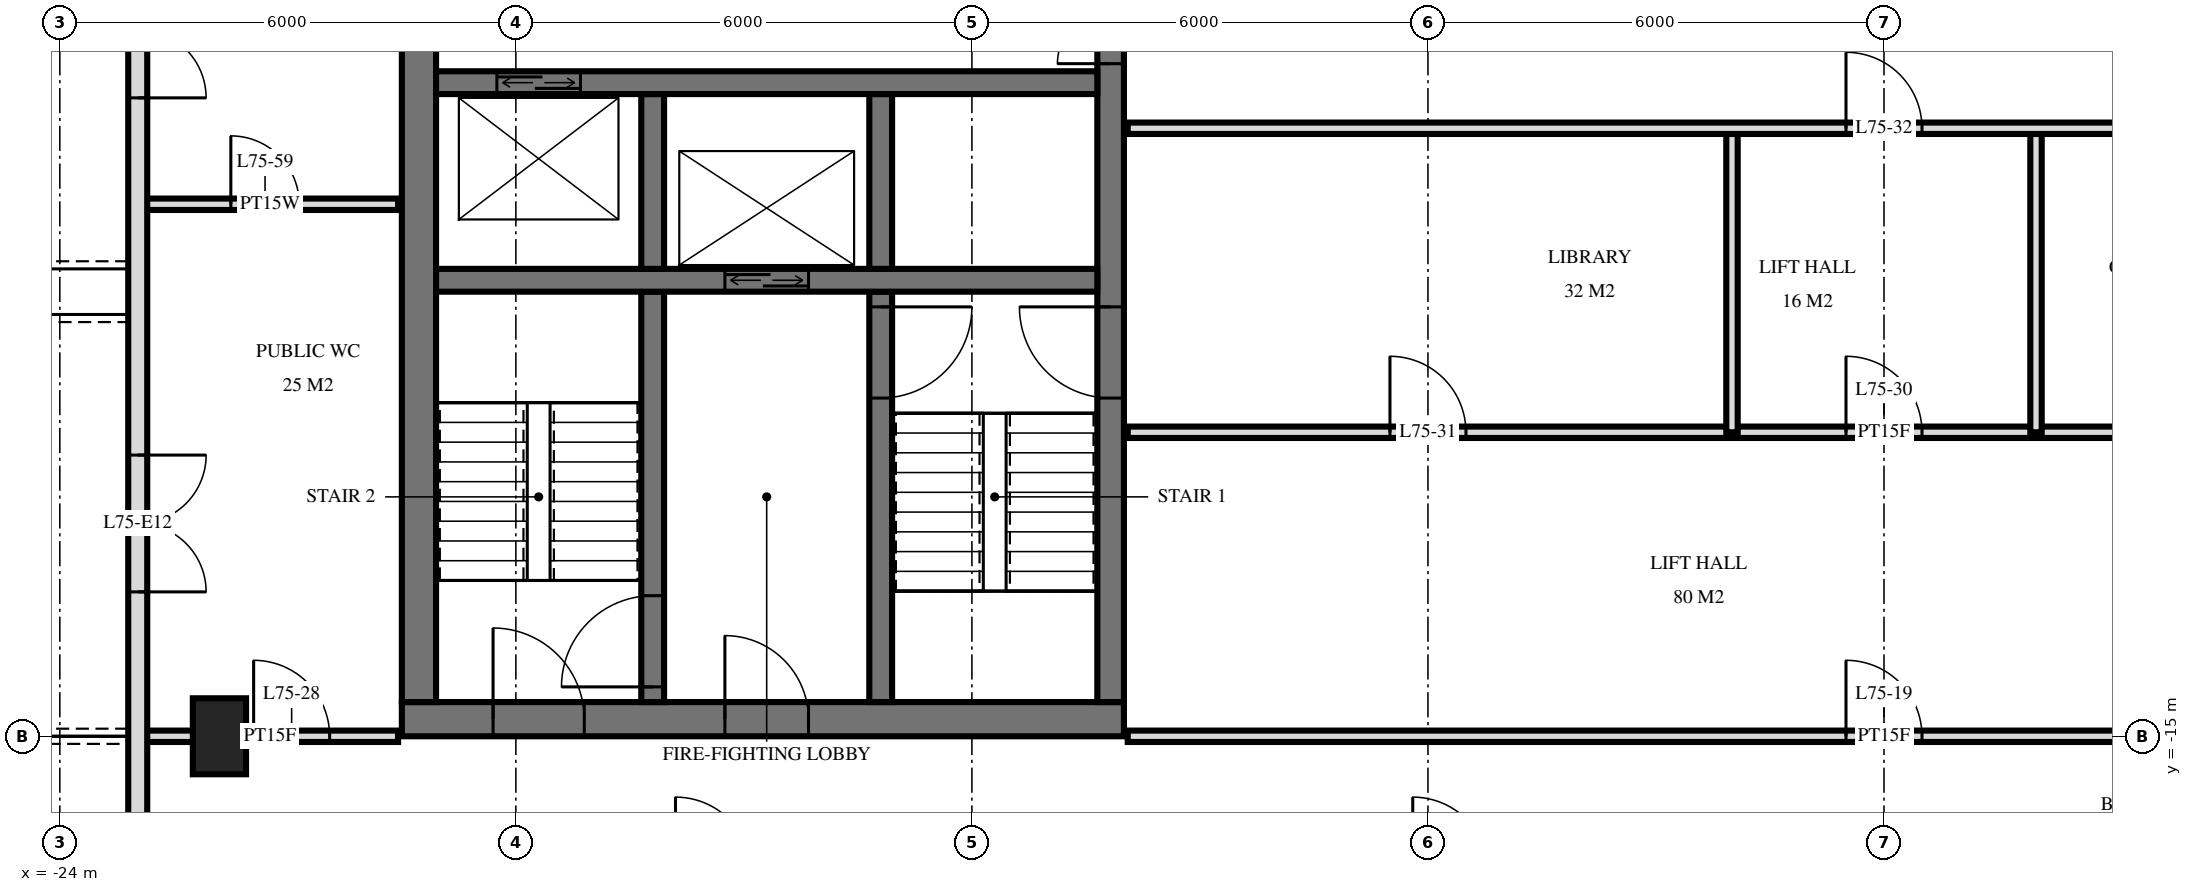
"""IFC4 building model, lengths in metres.
Left out: names, types, materials, properties, quantities, classifications, styles, units other than length and angle.
Written with IfcOpenShell. Run it as: python <this file> out.ifc"""

import sys

from ifc_helpers import new_model, si_unit, direction, frame, frame_2d, origin, origin_2d, place, context, subcontext, project, spatial, rectangle, extrude, element, fill, save


model = new_model("IFC4")
c1 = context("Model", 3, precision=1e-05, world=origin(), true_north=direction((0.0, 1.0)))
c2 = subcontext(c1, "Body", "Model", "MODEL_VIEW")
j1 = project(units=[si_unit("LENGTHUNIT", "METRE"), si_unit("PLANEANGLEUNIT", "RADIAN")], contexts=[c1])
p1 = place(None, origin())
s1 = spatial("IfcSite", under=j1, at=p1, CompositionType="ELEMENT")
p2 = place(p1, origin())
s2 = spatial("IfcBuilding", under=s1, at=p2, CompositionType="ELEMENT")
p3 = place(p2, frame((0.0, 0.0, 284.1)))
s3 = spatial("IfcBuildingStorey", under=s2, at=p3, CompositionType="ELEMENT", Elevation=284.1)
p4 = place(p3, frame((-21.9, -15.0, 0.0), z_axis=(0.0, 0.0, 1.0), x_axis=(0.0, 1.0, 0.0)))
e1 = element("IfcColumn", 1, at=p4, inside=s3, PredefinedType="COLUMN", context=c2, shape_type="SweptSolid", body=[
    extrude(rectangle(XDim=1.0, YDim=0.7, at=origin_2d()), origin(), (0.0, 0.0, 1.0), 3.5),
])
p5 = place(p3, frame((-19.5, -14.775, 0.0), z_axis=(0.0, 0.0, 1.0), x_axis=(1.0, 0.0, 0.0)))
e2 = element("IfcWall", 2, at=p5, inside=s3, PredefinedType="SHEAR", context=c2, shape_type="SweptSolid", body=[
    extrude(rectangle(XDim=9.5, YDim=0.45, at=frame_2d((4.75, 0.0))), origin(), (0.0, 0.0, 1.0), 3.5),
])
p6 = place(p5, frame((1.2, 0.0, 0.0)))
e3 = element("IfcOpeningElement", 3, at=p6, cuts=e2, PredefinedType="OPENING", context=c2, shape_type="SweptSolid", body=[
    extrude(rectangle(XDim=1.2, YDim=2.1, at=frame_2d((0.6, 1.05))), frame((0.0, 0.235, 0.0), z_axis=(0.0, -1.0, 0.0), x_axis=(1.0, 0.0, 0.0)), (0.0, 0.0, 1.0), 0.47),
])
p7 = place(p5, frame((4.25, 0.0, 0.0)))
e4 = element("IfcOpeningElement", 4, at=p7, cuts=e2, PredefinedType="OPENING", context=c2, shape_type="SweptSolid", body=[
    extrude(rectangle(XDim=1.1, YDim=2.1, at=frame_2d((0.55, 1.05))), frame((0.0, 0.235, 0.0), z_axis=(0.0, -1.0, 0.0), x_axis=(1.0, 0.0, 0.0)), (0.0, 0.0, 1.0), 0.47),
])
p8 = place(p3, frame((-10.175, -14.55, 0.0), z_axis=(0.0, 0.0, 1.0), x_axis=(0.0, 1.0, 0.0)))
e5 = element("IfcWall", 5, at=p8, inside=s3, PredefinedType="SHEAR", context=c2, shape_type="SweptSolid", body=[
    extrude(rectangle(XDim=14.1, YDim=0.35, at=frame_2d((7.05, 0.0))), origin(), (0.0, 0.0, 1.0), 3.5),
])
p9 = place(p8, frame((8.4, 0.0, 0.0)))
e6 = element("IfcOpeningElement", 6, at=p9, cuts=e5, PredefinedType="OPENING", context=c2, shape_type="SweptSolid", body=[
    extrude(rectangle(XDim=1.4, YDim=2.4, at=frame_2d((0.7, 1.2))), frame((0.0, 0.185, 0.0), z_axis=(0.0, -1.0, 0.0), x_axis=(1.0, 0.0, 0.0)), (0.0, 0.0, 1.0), 0.37),
])
p10 = place(p8, frame((10.0, 0.0, 0.0)))
e7 = element("IfcOpeningElement", 7, at=p10, cuts=e5, PredefinedType="OPENING", context=c2, shape_type="SweptSolid", body=[
    extrude(rectangle(XDim=1.4, YDim=2.4, at=frame_2d((0.7, 1.2))), frame((0.0, 0.185, 0.0), z_axis=(0.0, -1.0, 0.0), x_axis=(1.0, 0.0, 0.0)), (0.0, 0.0, 1.0), 0.37),
])
p11 = place(p8, frame((4.0, 0.0, 0.0)))
e8 = element("IfcOpeningElement", 8, at=p11, cuts=e5, PredefinedType="OPENING", context=c2, shape_type="SweptSolid", body=[
    extrude(rectangle(XDim=1.2, YDim=2.1, at=frame_2d((0.6, 1.05))), frame((0.0, 0.185, 0.0), z_axis=(0.0, -1.0, 0.0), x_axis=(1.0, 0.0, 0.0)), (0.0, 0.0, 1.0), 0.37),
])
p12 = place(p3, frame((-19.275, -14.55, 0.0), z_axis=(0.0, 0.0, 1.0), x_axis=(0.0, 1.0, 0.0)))
e9 = element("IfcWall", 9, at=p12, inside=s3, PredefinedType="SHEAR", context=c2, shape_type="SweptSolid", body=[
    extrude(rectangle(XDim=14.1, YDim=0.45, at=frame_2d((7.05, 0.0))), origin(), (0.0, 0.0, 1.0), 3.5),
])
p13 = place(p3, frame((-19.05, -6.4, 0.0), z_axis=(0.0, 0.0, 1.0), x_axis=(1.0, 0.0, 0.0)))
e10 = element("IfcWall", 10, at=p13, inside=s3, PredefinedType="SHEAR", context=c2, shape_type="SweptSolid", body=[
    extrude(rectangle(XDim=8.7, YDim=0.3, at=frame_2d((4.35, 0.0))), origin(), (0.0, 0.0, 1.0), 3.5),
])
p14 = place(p13, frame((0.8, 0.0, 0.0)))
e11 = element("IfcOpeningElement", 11, at=p14, cuts=e10, PredefinedType="OPENING", context=c2, shape_type="SweptSolid", body=[
    extrude(rectangle(XDim=1.1, YDim=2.1, at=frame_2d((0.55, 1.05))), frame((0.0, 0.16, 0.0), z_axis=(0.0, -1.0, 0.0), x_axis=(1.0, 0.0, 0.0)), (0.0, 0.0, 1.0), 0.32),
])
p15 = place(p3, frame((-19.05, -9.0, 0.0), z_axis=(0.0, 0.0, 1.0), x_axis=(1.0, 0.0, 0.0)))
e12 = element("IfcWall", 12, at=p15, inside=s3, PredefinedType="SHEAR", context=c2, shape_type="SweptSolid", body=[
    extrude(rectangle(XDim=8.7, YDim=0.3, at=frame_2d((4.35, 0.0))), origin(), (0.0, 0.0, 1.0), 3.5),
])
p16 = place(p15, frame((3.8, 0.0, 0.0)))
e13 = element("IfcOpeningElement", 13, at=p16, cuts=e12, PredefinedType="OPENING", context=c2, shape_type="SweptSolid", body=[
    extrude(rectangle(XDim=1.1, YDim=2.1, at=frame_2d((0.55, 1.05))), frame((0.0, 0.16, 0.0), z_axis=(0.0, -1.0, 0.0), x_axis=(1.0, 0.0, 0.0)), (0.0, 0.0, 1.0), 0.32),
])
p17 = place(p3, frame((-13.2, -8.85, 0.0), z_axis=(0.0, 0.0, 1.0), x_axis=(0.0, 1.0, 0.0)))
e14 = element("IfcWall", 14, at=p17, inside=s3, PredefinedType="SHEAR", context=c2, shape_type="SweptSolid", body=[
    extrude(rectangle(XDim=2.3, YDim=0.3, at=frame_2d((1.15, 0.0))), origin(), (0.0, 0.0, 1.0), 3.5),
])
p18 = place(p3, frame((-13.2, -14.55, 0.0), z_axis=(0.0, 0.0, 1.0), x_axis=(0.0, 1.0, 0.0)))
e15 = element("IfcWall", 15, at=p18, inside=s3, PredefinedType="SHEAR", context=c2, shape_type="SweptSolid", body=[
    extrude(rectangle(XDim=5.4, YDim=0.3, at=frame_2d((2.7, 0.0))), origin(), (0.0, 0.0, 1.0), 3.5),
])
p19 = place(p18, frame((4.0, 0.0, 0.0)))
e16 = element("IfcOpeningElement", 16, at=p19, cuts=e15, PredefinedType="OPENING", context=c2, shape_type="SweptSolid", body=[
    extrude(rectangle(XDim=1.2, YDim=2.1, at=frame_2d((0.6, 1.05))), frame((0.0, 0.16, 0.0), z_axis=(0.0, -1.0, 0.0), x_axis=(1.0, 0.0, 0.0)), (0.0, 0.0, 1.0), 0.32),
])
p20 = place(p3, frame((-16.2, -8.85, 0.0), z_axis=(0.0, 0.0, 1.0), x_axis=(0.0, 1.0, 0.0)))
e17 = element("IfcWall", 17, at=p20, inside=s3, PredefinedType="SHEAR", context=c2, shape_type="SweptSolid", body=[
    extrude(rectangle(XDim=2.3, YDim=0.3, at=frame_2d((1.15, 0.0))), origin(), (0.0, 0.0, 1.0), 3.5),
])
p21 = place(p3, frame((-16.2, -14.55, 0.0), z_axis=(0.0, 0.0, 1.0), x_axis=(0.0, 1.0, 0.0)))
e18 = element("IfcWall", 18, at=p21, inside=s3, PredefinedType="SHEAR", context=c2, shape_type="SweptSolid", body=[
    extrude(rectangle(XDim=5.4, YDim=0.3, at=frame_2d((2.7, 0.0))), origin(), (0.0, 0.0, 1.0), 3.5),
])
p22 = place(p21, frame((0.2, 0.0, 0.0)))
e19 = element("IfcOpeningElement", 19, at=p22, cuts=e18, PredefinedType="OPENING", context=c2, shape_type="SweptSolid", body=[
    extrude(rectangle(XDim=1.2, YDim=2.1, at=frame_2d((0.6, 1.05))), frame((0.0, 0.16, 0.0), z_axis=(0.0, -1.0, 0.0), x_axis=(1.0, 0.0, 0.0)), (0.0, 0.0, 1.0), 0.32),
])
p23 = place(p3, frame((-22.975, -3.325, 0.0), z_axis=(0.0, 0.0, 1.0), x_axis=(0.0, -1.0, 0.0)))
e20 = element("IfcWall", 20, at=p23, inside=s3, PredefinedType="SOLIDWALL", context=c2, shape_type="SweptSolid", body=[
    extrude(rectangle(XDim=25.951, YDim=0.25, at=frame_2d((12.975, 0.0))), origin(), (0.0, 0.0, 1.0), 3.22),
])
p24 = place(p23, frame((1.475, 0.0, 0.0)))
e21 = element("IfcOpeningElement", 21, at=p24, cuts=e20, PredefinedType="OPENING", context=c2, shape_type="SweptSolid", body=[
    extrude(rectangle(XDim=1.8, YDim=2.4, at=frame_2d((0.9, 1.2))), frame((0.0, 0.135, 0.0), z_axis=(0.0, -1.0, 0.0), x_axis=(1.0, 0.0, 0.0)), (0.0, 0.0, 1.0), 0.27),
])
p25 = place(p23, frame((7.975, 0.0, 0.0)))
e22 = element("IfcOpeningElement", 22, at=p25, cuts=e20, PredefinedType="OPENING", context=c2, shape_type="SweptSolid", body=[
    extrude(rectangle(XDim=1.8, YDim=2.4, at=frame_2d((0.9, 1.2))), frame((0.0, 0.135, 0.0), z_axis=(0.0, -1.0, 0.0), x_axis=(1.0, 0.0, 0.0)), (0.0, 0.0, 1.0), 0.27),
])
p26 = place(p23, frame((18.175, 0.0, 0.0)))
e23 = element("IfcOpeningElement", 23, at=p26, cuts=e20, PredefinedType="OPENING", context=c2, shape_type="SweptSolid", body=[
    extrude(rectangle(XDim=1.8, YDim=2.4, at=frame_2d((0.9, 1.2))), frame((0.0, 0.135, 0.0), z_axis=(0.0, -1.0, 0.0), x_axis=(1.0, 0.0, 0.0)), (0.0, 0.0, 1.0), 0.27),
])
p27 = place(p23, frame((21.075, 0.0, 0.0)))
e24 = element("IfcOpeningElement", 24, at=p27, cuts=e20, PredefinedType="OPENING", context=c2, shape_type="SweptSolid", body=[
    extrude(rectangle(XDim=1.8, YDim=2.4, at=frame_2d((0.9, 1.2))), frame((0.0, 0.135, 0.0), z_axis=(0.0, -1.0, 0.0), x_axis=(1.0, 0.0, 0.0)), (0.0, 0.0, 1.0), 0.27),
])
p28 = place(p23, frame((23.825, 0.0, 0.9)))
e25 = element("IfcOpeningElement", 25, at=p28, cuts=e20, PredefinedType="OPENING", context=c2, shape_type="SweptSolid", body=[
    extrude(rectangle(XDim=1.8, YDim=1.5, at=frame_2d((0.9, 0.75))), frame((0.0, 0.135, 0.0), z_axis=(0.0, -1.0, 0.0), x_axis=(1.0, 0.0, 0.0)), (0.0, 0.0, 1.0), 0.27),
])
for number, where, z_axis, x_axis in (
    (26, (2.0, -11.0, 0.0), (0.0, 0.0, 1.0), (0.0, 1.0, 0.0)),
    (27, (-2.0, -11.0, 0.0), (0.0, 0.0, 1.0), (0.0, 1.0, 0.0)),
):
    element("IfcWall", number, at=place(p3, frame(where, z_axis=z_axis, x_axis=x_axis)), inside=s3, PredefinedType="PARTITIONING", context=c2, shape_type="SweptSolid", body=[
        extrude(rectangle(XDim=4.0, YDim=0.15, at=frame_2d((2.0, 0.0))), origin(), (0.0, 0.0, 1.0), 3.22),
    ])
p29 = place(p3, frame((-22.92, -15.0, 0.0), z_axis=(0.0, 0.0, 1.0), x_axis=(1.0, 0.0, 0.0)))
e28 = element("IfcWall", 28, at=p29, inside=s3, PredefinedType="PARTITIONING", context=c2, shape_type="SweptSolid", body=[
    extrude(rectangle(XDim=3.37, YDim=0.15, at=frame_2d((1.685, 0.0))), origin(), (0.0, 0.0, 1.0), 3.22),
])
p30 = place(p29, frame((1.47, 0.0, 0.0)))
e29 = element("IfcOpeningElement", 29, at=p30, cuts=e28, PredefinedType="OPENING", context=c2, shape_type="SweptSolid", body=[
    extrude(rectangle(XDim=1.0, YDim=2.1, at=frame_2d((0.5, 1.05))), frame((0.0, 0.085, 0.0), z_axis=(0.0, -1.0, 0.0), x_axis=(1.0, 0.0, 0.0)), (0.0, 0.0, 1.0), 0.17),
])
p31 = place(p3, frame((-9.95, -15.0, 0.0), z_axis=(0.0, 0.0, 1.0), x_axis=(1.0, 0.0, 0.0)))
e30 = element("IfcWall", 30, at=p31, inside=s3, PredefinedType="PARTITIONING", context=c2, shape_type="SweptSolid", body=[
    extrude(rectangle(XDim=19.9, YDim=0.15, at=frame_2d((9.95, 0.0))), origin(), (0.0, 0.0, 1.0), 2.584),
])
p32 = place(p31, frame((9.45, 0.0, 0.0)))
e31 = element("IfcOpeningElement", 31, at=p32, cuts=e30, PredefinedType="OPENING", context=c2, shape_type="SweptSolid", body=[
    extrude(rectangle(XDim=1.0, YDim=2.1, at=frame_2d((0.5, 1.05))), frame((0.0, 0.085, 0.0), z_axis=(0.0, -1.0, 0.0), x_axis=(1.0, 0.0, 0.0)), (0.0, 0.0, 1.0), 0.17),
])
p33 = place(p3, frame((-9.95, -11.0, 0.0), z_axis=(0.0, 0.0, 1.0), x_axis=(1.0, 0.0, 0.0)))
e32 = element("IfcWall", 32, at=p33, inside=s3, PredefinedType="PARTITIONING", context=c2, shape_type="SweptSolid", body=[
    extrude(rectangle(XDim=19.9, YDim=0.15, at=frame_2d((9.95, 0.0))), origin(), (0.0, 0.0, 1.0), 3.22),
])
p34 = place(p33, frame((9.45, 0.0, 0.0)))
e33 = element("IfcOpeningElement", 33, at=p34, cuts=e32, PredefinedType="OPENING", context=c2, shape_type="SweptSolid", body=[
    extrude(rectangle(XDim=1.0, YDim=2.1, at=frame_2d((0.5, 1.05))), frame((0.0, 0.085, 0.0), z_axis=(0.0, -1.0, 0.0), x_axis=(1.0, 0.0, 0.0)), (0.0, 0.0, 1.0), 0.17),
])
p35 = place(p33, frame((3.45, 0.0, 0.0)))
e34 = element("IfcOpeningElement", 34, at=p35, cuts=e32, PredefinedType="OPENING", context=c2, shape_type="SweptSolid", body=[
    extrude(rectangle(XDim=1.0, YDim=2.1, at=frame_2d((0.5, 1.05))), frame((0.0, 0.085, 0.0), z_axis=(0.0, -1.0, 0.0), x_axis=(1.0, 0.0, 0.0)), (0.0, 0.0, 1.0), 0.17),
])
p36 = place(p3, frame((-22.92, -8.0, 0.0), z_axis=(0.0, 0.0, 1.0), x_axis=(1.0, 0.0, 0.0)))
e35 = element("IfcWall", 35, at=p36, inside=s3, PredefinedType="PLUMBINGWALL", context=c2, shape_type="SweptSolid", body=[
    extrude(rectangle(XDim=3.37, YDim=0.15, at=frame_2d((1.685, 0.0))), origin(), (0.0, 0.0, 1.0), 3.22),
])
p37 = place(p36, frame((1.17, 0.0, 0.0)))
e36 = element("IfcOpeningElement", 36, at=p37, cuts=e35, PredefinedType="OPENING", context=c2, shape_type="SweptSolid", body=[
    extrude(rectangle(XDim=0.9, YDim=2.1, at=frame_2d((0.45, 1.05))), frame((0.0, 0.085, 0.0), z_axis=(0.0, -1.0, 0.0), x_axis=(1.0, 0.0, 0.0)), (0.0, 0.0, 1.0), 0.17),
])
p38 = place(p3, frame((-9.95, -7.0, 0.0), z_axis=(0.0, 0.0, 1.0), x_axis=(1.0, 0.0, 0.0)))
e37 = element("IfcWall", 37, at=p38, inside=s3, PredefinedType="PARTITIONING", context=c2, shape_type="SweptSolid", body=[
    extrude(rectangle(XDim=19.9, YDim=0.15, at=frame_2d((9.95, 0.0))), origin(), (0.0, 0.0, 1.0), 3.22),
])
p39 = place(p38, frame((9.45, 0.0, 0.0)))
e38 = element("IfcOpeningElement", 38, at=p39, cuts=e37, PredefinedType="OPENING", context=c2, shape_type="SweptSolid", body=[
    extrude(rectangle(XDim=1.0, YDim=2.1, at=frame_2d((0.5, 1.05))), frame((0.0, 0.085, 0.0), z_axis=(0.0, -1.0, 0.0), x_axis=(1.0, 0.0, 0.0)), (0.0, 0.0, 1.0), 0.17),
])
p40 = place(p38, frame((15.45, 0.0, 0.0)))
e39 = element("IfcOpeningElement", 39, at=p40, cuts=e37, PredefinedType="OPENING", context=c2, shape_type="SweptSolid", body=[
    extrude(rectangle(XDim=1.0, YDim=2.1, at=frame_2d((0.5, 1.05))), frame((0.0, 0.085, 0.0), z_axis=(0.0, -1.0, 0.0), x_axis=(1.0, 0.0, 0.0)), (0.0, 0.0, 1.0), 0.17),
])
p41 = place(p24, origin())
e40 = element("IfcDoor", 40, at=p41, inside=s3, OperationType="DOUBLE_DOOR_SINGLE_SWING", PredefinedType="DOOR", context=c2, shape_type="SweptSolid", body=[
    extrude(rectangle(XDim=1.8, YDim=2.4, at=frame_2d((0.9, 1.2))), frame((0.0, 0.025, 0.0), z_axis=(0.0, -1.0, 0.0), x_axis=(1.0, 0.0, 0.0)), (0.0, 0.0, 1.0), 0.05),
])
fill(e21, e40)
p42 = place(p25, origin())
e41 = element("IfcDoor", 41, at=p42, inside=s3, OperationType="DOUBLE_DOOR_SINGLE_SWING", PredefinedType="DOOR", context=c2, shape_type="SweptSolid", body=[
    extrude(rectangle(XDim=1.8, YDim=2.4, at=frame_2d((0.9, 1.2))), frame((0.0, 0.025, 0.0), z_axis=(0.0, -1.0, 0.0), x_axis=(1.0, 0.0, 0.0)), (0.0, 0.0, 1.0), 0.05),
])
fill(e22, e41)
p43 = place(p16, origin())
e42 = element("IfcDoor", 42, at=p43, inside=s3, OperationType="DOUBLE_DOOR_SLIDING", PredefinedType="USERDEFINED", context=c2, shape_type="SweptSolid", body=[
    extrude(rectangle(XDim=1.1, YDim=2.1, at=frame_2d((0.55, 1.05))), frame((0.0, 0.025, 0.0), z_axis=(0.0, -1.0, 0.0), x_axis=(1.0, 0.0, 0.0)), (0.0, 0.0, 1.0), 0.05),
])
fill(e13, e42)
p44 = place(p14, origin())
e43 = element("IfcDoor", 43, at=p44, inside=s3, OperationType="DOUBLE_DOOR_SLIDING", PredefinedType="USERDEFINED", context=c2, shape_type="SweptSolid", body=[
    extrude(rectangle(XDim=1.1, YDim=2.1, at=frame_2d((0.55, 1.05))), frame((0.0, 0.025, 0.0), z_axis=(0.0, -1.0, 0.0), x_axis=(1.0, 0.0, 0.0)), (0.0, 0.0, 1.0), 0.05),
])
fill(e11, e43)
p45 = place(p9, origin())
e44 = element("IfcDoor", 44, at=p45, inside=s3, OperationType="DOUBLE_DOOR_SINGLE_SWING", PredefinedType="DOOR", context=c2, shape_type="SweptSolid", body=[
    extrude(rectangle(XDim=1.4, YDim=2.4, at=frame_2d((0.7, 1.2))), frame((0.0, 0.025, 0.0), z_axis=(0.0, -1.0, 0.0), x_axis=(1.0, 0.0, 0.0)), (0.0, 0.0, 1.0), 0.05),
])
fill(e6, e44)
p46 = place(p11, origin())
e45 = element("IfcDoor", 45, at=p46, inside=s3, OperationType="SINGLE_SWING_LEFT", PredefinedType="DOOR", context=c2, shape_type="SweptSolid", body=[
    extrude(rectangle(XDim=1.2, YDim=2.1, at=frame_2d((0.6, 1.05))), frame((0.0, 0.025, 0.0), z_axis=(0.0, -1.0, 0.0), x_axis=(1.0, 0.0, 0.0)), (0.0, 0.0, 1.0), 0.05),
])
fill(e8, e45)
p47 = place(p6, origin())
e46 = element("IfcDoor", 46, at=p47, inside=s3, OperationType="SINGLE_SWING_RIGHT", PredefinedType="DOOR", context=c2, shape_type="SweptSolid", body=[
    extrude(rectangle(XDim=1.2, YDim=2.1, at=frame_2d((0.6, 1.05))), frame((0.0, 0.025, 0.0), z_axis=(0.0, -1.0, 0.0), x_axis=(1.0, 0.0, 0.0)), (0.0, 0.0, 1.0), 0.05),
])
fill(e3, e46)
p48 = place(p7, origin())
e47 = element("IfcDoor", 47, at=p48, inside=s3, OperationType="SINGLE_SWING_RIGHT", PredefinedType="DOOR", context=c2, shape_type="SweptSolid", body=[
    extrude(rectangle(XDim=1.1, YDim=2.1, at=frame_2d((0.55, 1.05))), frame((0.0, 0.025, 0.0), z_axis=(0.0, -1.0, 0.0), x_axis=(1.0, 0.0, 0.0)), (0.0, 0.0, 1.0), 0.05),
])
fill(e4, e47)
p49 = place(p19, frame((0.6, 0.0, 0.0), z_axis=(0.0, 0.0, 1.0), x_axis=(-1.0, 0.0, 0.0)))
e48 = element("IfcDoor", 48, at=p49, inside=s3, OperationType="SINGLE_SWING_RIGHT", PredefinedType="DOOR", context=c2, shape_type="SweptSolid", body=[
    extrude(rectangle(XDim=1.2, YDim=2.1, at=frame_2d((0.0, 1.05))), frame((0.0, -0.025, 0.0), z_axis=(0.0, 1.0, 0.0), x_axis=(-1.0, 0.0, 0.0)), (0.0, 0.0, 1.0), 0.05),
])
fill(e16, e48)
p50 = place(p22, origin())
e49 = element("IfcDoor", 49, at=p50, inside=s3, OperationType="SINGLE_SWING_RIGHT", PredefinedType="DOOR", context=c2, shape_type="SweptSolid", body=[
    extrude(rectangle(XDim=1.2, YDim=2.1, at=frame_2d((0.6, 1.05))), frame((0.0, 0.025, 0.0), z_axis=(0.0, -1.0, 0.0), x_axis=(1.0, 0.0, 0.0)), (0.0, 0.0, 1.0), 0.05),
])
fill(e19, e49)
p51 = place(p32, origin())
e50 = element("IfcDoor", 50, at=p51, inside=s3, OperationType="SINGLE_SWING_RIGHT", PredefinedType="DOOR", context=c2, shape_type="SweptSolid", body=[
    extrude(rectangle(XDim=1.0, YDim=2.1, at=frame_2d((0.5, 1.05))), frame((0.0, 0.025, 0.0), z_axis=(0.0, -1.0, 0.0), x_axis=(1.0, 0.0, 0.0)), (0.0, 0.0, 1.0), 0.05),
])
fill(e31, e50)
p52 = place(p30, origin())
e51 = element("IfcDoor", 51, at=p52, inside=s3, OperationType="SINGLE_SWING_RIGHT", PredefinedType="DOOR", context=c2, shape_type="SweptSolid", body=[
    extrude(rectangle(XDim=1.0, YDim=2.1, at=frame_2d((0.5, 1.05))), frame((0.0, 0.025, 0.0), z_axis=(0.0, -1.0, 0.0), x_axis=(1.0, 0.0, 0.0)), (0.0, 0.0, 1.0), 0.05),
])
fill(e29, e51)
p53 = place(p34, origin())
e52 = element("IfcDoor", 52, at=p53, inside=s3, OperationType="SINGLE_SWING_RIGHT", PredefinedType="DOOR", context=c2, shape_type="SweptSolid", body=[
    extrude(rectangle(XDim=1.0, YDim=2.1, at=frame_2d((0.5, 1.05))), frame((0.0, 0.025, 0.0), z_axis=(0.0, -1.0, 0.0), x_axis=(1.0, 0.0, 0.0)), (0.0, 0.0, 1.0), 0.05),
])
fill(e33, e52)
p54 = place(p35, origin())
e53 = element("IfcDoor", 53, at=p54, inside=s3, OperationType="SINGLE_SWING_RIGHT", PredefinedType="DOOR", context=c2, shape_type="SweptSolid", body=[
    extrude(rectangle(XDim=1.0, YDim=2.1, at=frame_2d((0.5, 1.05))), frame((0.0, 0.025, 0.0), z_axis=(0.0, -1.0, 0.0), x_axis=(1.0, 0.0, 0.0)), (0.0, 0.0, 1.0), 0.05),
])
fill(e34, e53)
p55 = place(p39, origin())
e54 = element("IfcDoor", 54, at=p55, inside=s3, OperationType="SINGLE_SWING_RIGHT", PredefinedType="DOOR", context=c2, shape_type="SweptSolid", body=[
    extrude(rectangle(XDim=1.0, YDim=2.1, at=frame_2d((0.5, 1.05))), frame((0.0, 0.025, 0.0), z_axis=(0.0, -1.0, 0.0), x_axis=(1.0, 0.0, 0.0)), (0.0, 0.0, 1.0), 0.05),
])
fill(e38, e54)
p56 = place(p37, origin())
e55 = element("IfcDoor", 55, at=p56, inside=s3, OperationType="SINGLE_SWING_RIGHT", PredefinedType="DOOR", context=c2, shape_type="SweptSolid", body=[
    extrude(rectangle(XDim=0.9, YDim=2.1, at=frame_2d((0.45, 1.05))), frame((0.0, 0.025, 0.0), z_axis=(0.0, -1.0, 0.0), x_axis=(1.0, 0.0, 0.0)), (0.0, 0.0, 1.0), 0.05),
])
fill(e36, e55)
save(model, sys.argv[1])
